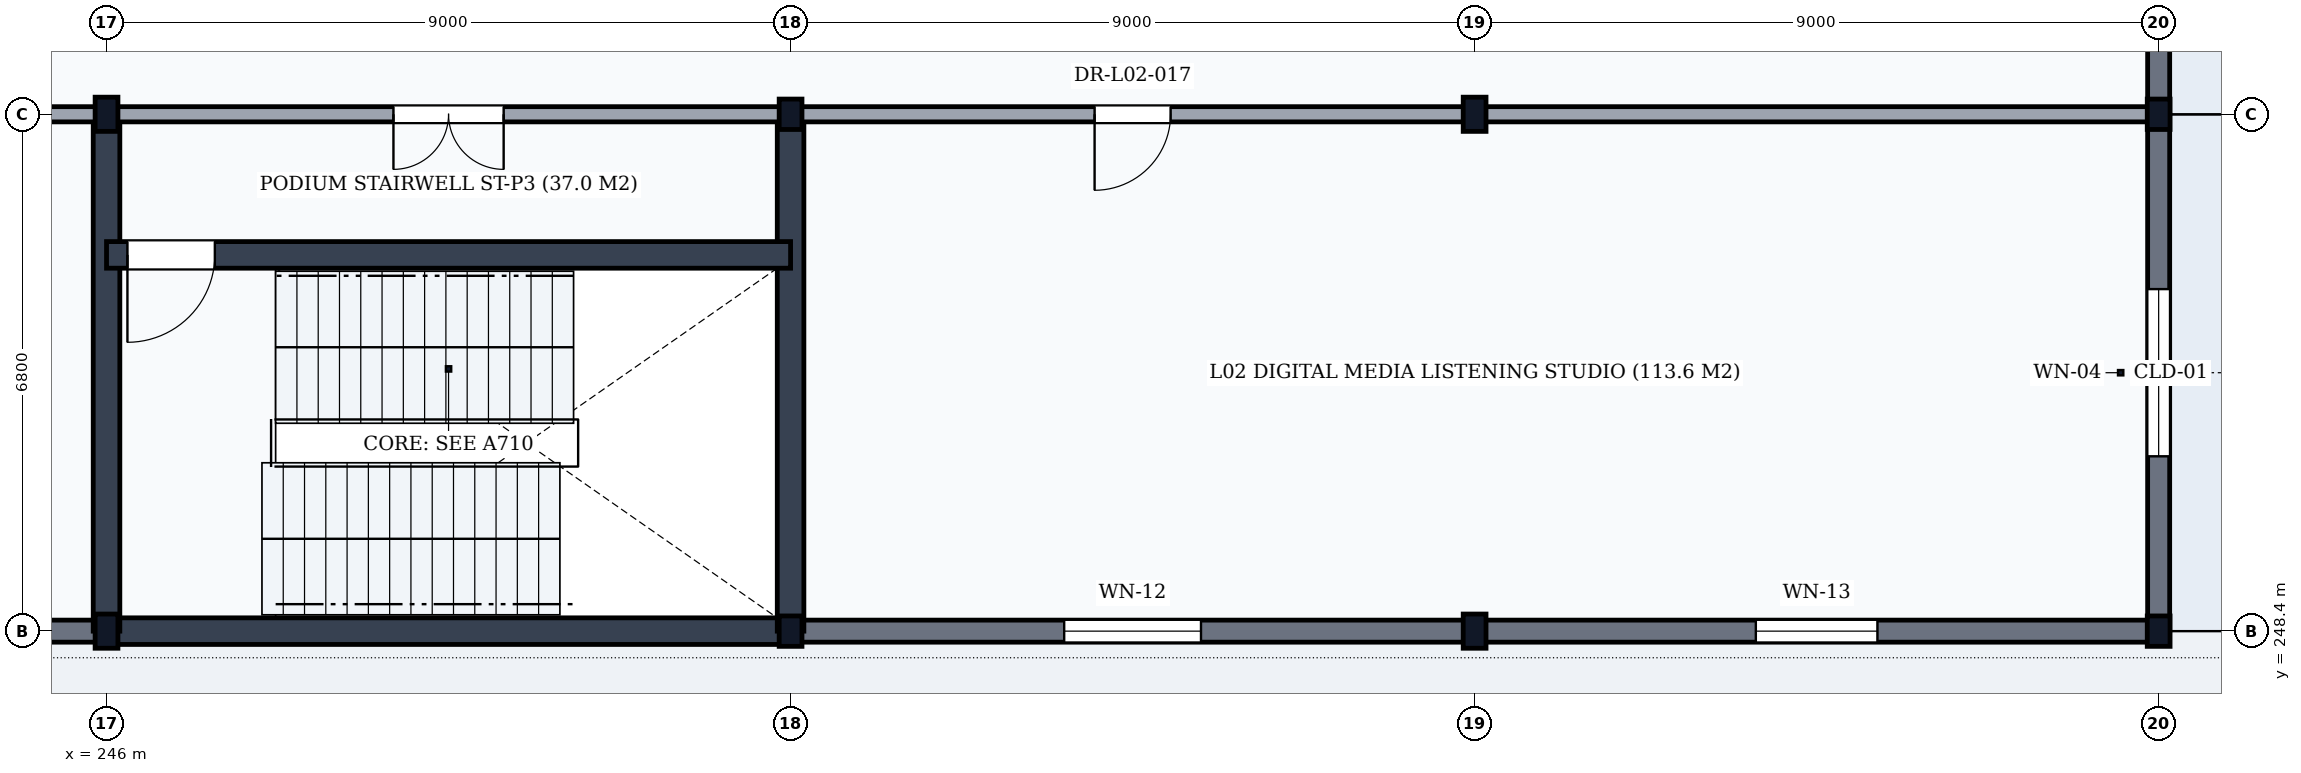
"""IFC4 building model, lengths in metres.
Left out: names, types, materials, properties, quantities, classifications, styles, units other than length and angle.
Written with IfcOpenShell. Run it as: python <this file> out.ifc"""

import sys

from ifc_helpers import new_model, si_unit, direction, frame, frame_2d, origin, origin_2d, place, context, subcontext, project, spatial, rectangle, i_section, extrude, element, fill, save


model = new_model("IFC4")
c1 = context("Model", 3, precision=1e-05, world=origin(), true_north=direction((0.0, 1.0)))
c2 = subcontext(c1, "Body", "Model", "MODEL_VIEW")
j1 = project(units=[si_unit("LENGTHUNIT", "METRE"), si_unit("PLANEANGLEUNIT", "RADIAN")], contexts=[c1])
p1 = place(None, origin())
s1 = spatial("IfcSite", under=j1, at=p1, CompositionType="ELEMENT")
p2 = place(p1, origin())
s2 = spatial("IfcBuilding", under=s1, at=p2, CompositionType="ELEMENT")
p3 = place(p2, frame((0.0, 0.0, 5.4)))
s3 = spatial("IfcBuildingStorey", under=s2, at=p3, CompositionType="ELEMENT", Elevation=5.4)
for number, where, z_axis, x_axis in (
    (1, (246.0, 248.4, 0.0), (0.0, 0.0, 1.0), (1.0, 0.0, 0.0)),
    (2, (246.0, 255.2, 0.0), (0.0, 0.0, 1.0), (1.0, 0.0, 0.0)),
):
    element("IfcColumn", number, at=place(p3, frame(where, z_axis=z_axis, x_axis=x_axis)), inside=s3, PredefinedType="COLUMN", context=c2, shape_type="SweptSolid", body=[
        extrude(i_section(OverallWidth=0.3, OverallDepth=0.45, WebThickness=0.014, FlangeThickness=0.026, FilletRadius=0.027, at=origin_2d()), origin(), (0.0, 0.0, 1.0), 5.1),
    ])
for number, where, z_axis, x_axis in (
    (3, (255.0, 248.4, 0.0), (0.0, 0.0, 1.0), (1.0, 0.0, 0.0)),
    (4, (255.0, 255.2, 0.0), (0.0, 0.0, 1.0), (1.0, 0.0, 0.0)),
):
    element("IfcColumn", number, at=place(p3, frame(where, z_axis=z_axis, x_axis=x_axis)), inside=s3, PredefinedType="COLUMN", context=c2, shape_type="SweptSolid", body=[
        extrude(i_section(OverallWidth=0.3, OverallDepth=0.4, WebThickness=0.013, FlangeThickness=0.024, FilletRadius=0.027, at=origin_2d()), origin(), (0.0, 0.0, 1.0), 5.1),
    ])
for number, where, z_axis, x_axis in (
    (5, (264.0, 248.4, 0.0), (0.0, 0.0, 1.0), (1.0, 0.0, 0.0)),
    (6, (264.0, 255.2, 0.0), (0.0, 0.0, 1.0), (1.0, 0.0, 0.0)),
):
    element("IfcColumn", number, at=place(p3, frame(where, z_axis=z_axis, x_axis=x_axis)), inside=s3, PredefinedType="COLUMN", context=c2, shape_type="SweptSolid", body=[
        extrude(i_section(OverallWidth=0.3, OverallDepth=0.45, WebThickness=0.014, FlangeThickness=0.026, FilletRadius=0.027, at=origin_2d()), origin(), (0.0, 0.0, 1.0), 5.1),
    ])
for number, where, z_axis, x_axis in (
    (7, (273.0, 248.4, 0.0), (0.0, 0.0, 1.0), (1.0, 0.0, 0.0)),
    (8, (273.0, 255.2, 0.0), (0.0, 0.0, 1.0), (1.0, 0.0, 0.0)),
):
    element("IfcColumn", number, at=place(p3, frame(where, z_axis=z_axis, x_axis=x_axis)), inside=s3, PredefinedType="COLUMN", context=c2, shape_type="SweptSolid", body=[
        extrude(i_section(OverallWidth=0.3, OverallDepth=0.4, WebThickness=0.013, FlangeThickness=0.024, FilletRadius=0.027, at=origin_2d()), origin(), (0.0, 0.0, 1.0), 5.1),
    ])
p4 = place(p3, frame((237.006, 248.4, 0.0), z_axis=(0.0, 0.0, 1.0), x_axis=(1.0, 0.0, 0.0)))
e9 = element("IfcWall", 9, at=p4, inside=s3, PredefinedType="SOLIDWALL", context=c2, shape_type="SweptSolid", body=[
    extrude(rectangle(XDim=8.988, YDim=0.29, at=frame_2d((4.494, 0.0))), origin(), (0.0, 0.0, 1.0), 4.508),
])
p5 = place(p4, frame((3.394, 0.0, 0.95)))
e10 = element("IfcOpeningElement", 10, at=p5, cuts=e9, PredefinedType="OPENING", context=c2, shape_type="SweptSolid", body=[
    extrude(rectangle(XDim=2.2, YDim=2.1, at=frame_2d((1.1, 1.05))), frame((0.0, 0.16, 0.0), z_axis=(0.0, -1.0, 0.0), x_axis=(1.0, 0.0, 0.0)), (0.0, 0.0, 1.0), 0.32),
])
p6 = place(p3, frame((255.006, 248.4, 0.0), z_axis=(0.0, 0.0, 1.0), x_axis=(1.0, 0.0, 0.0)))
e11 = element("IfcWall", 11, at=p6, inside=s3, PredefinedType="SOLIDWALL", context=c2, shape_type="SweptSolid", body=[
    extrude(rectangle(XDim=8.988, YDim=0.29, at=frame_2d((4.494, 0.0))), origin(), (0.0, 0.0, 1.0), 4.508),
])
p7 = place(p6, frame((3.594, 0.0, 0.95)))
e12 = element("IfcOpeningElement", 12, at=p7, cuts=e11, PredefinedType="OPENING", context=c2, shape_type="SweptSolid", body=[
    extrude(rectangle(XDim=1.8, YDim=2.0, at=frame_2d((0.9, 1.0))), frame((0.0, 0.16, 0.0), z_axis=(0.0, -1.0, 0.0), x_axis=(1.0, 0.0, 0.0)), (0.0, 0.0, 1.0), 0.32),
])
p8 = place(p3, frame((264.006, 248.4, 0.0), z_axis=(0.0, 0.0, 1.0), x_axis=(1.0, 0.0, 0.0)))
e13 = element("IfcWall", 13, at=p8, inside=s3, PredefinedType="SOLIDWALL", context=c2, shape_type="SweptSolid", body=[
    extrude(rectangle(XDim=8.988, YDim=0.29, at=frame_2d((4.494, 0.0))), origin(), (0.0, 0.0, 1.0), 4.508),
])
p9 = place(p8, frame((3.694, 0.0, 0.95)))
e14 = element("IfcOpeningElement", 14, at=p9, cuts=e13, PredefinedType="OPENING", context=c2, shape_type="SweptSolid", body=[
    extrude(rectangle(XDim=1.6, YDim=2.0, at=frame_2d((0.8, 1.0))), frame((0.0, 0.16, 0.0), z_axis=(0.0, -1.0, 0.0), x_axis=(1.0, 0.0, 0.0)), (0.0, 0.0, 1.0), 0.32),
])
p10 = place(p3, frame((273.0, 248.406, 0.0), z_axis=(0.0, 0.0, 1.0), x_axis=(0.0, 1.0, 0.0)))
e15 = element("IfcWall", 15, at=p10, inside=s3, PredefinedType="SOLIDWALL", context=c2, shape_type="SweptSolid", body=[
    extrude(rectangle(XDim=6.788, YDim=0.29, at=frame_2d((3.394, 0.0))), origin(), (0.0, 0.0, 1.0), 4.628),
])
p11 = place(p10, frame((2.294, 0.0, 0.95)))
e16 = element("IfcOpeningElement", 16, at=p11, cuts=e15, PredefinedType="OPENING", context=c2, shape_type="SweptSolid", body=[
    extrude(rectangle(XDim=2.2, YDim=2.8, at=frame_2d((1.1, 1.4))), frame((0.0, 0.16, 0.0), z_axis=(0.0, -1.0, 0.0), x_axis=(1.0, 0.0, 0.0)), (0.0, 0.0, 1.0), 0.32),
])
p12 = place(p3, frame((273.0, 255.206, 0.0), z_axis=(0.0, 0.0, 1.0), x_axis=(0.0, 1.0, 0.0)))
e17 = element("IfcWall", 17, at=p12, inside=s3, PredefinedType="SOLIDWALL", context=c2, shape_type="SweptSolid", body=[
    extrude(rectangle(XDim=7.588, YDim=0.29, at=frame_2d((3.794, 0.0))), origin(), (0.0, 0.0, 1.0), 4.588),
])
p13 = place(p12, frame((4.066, 0.0, 0.95)))
e18 = element("IfcOpeningElement", 18, at=p13, cuts=e17, PredefinedType="OPENING", context=c2, shape_type="SweptSolid", body=[
    extrude(rectangle(XDim=2.0, YDim=2.6, at=frame_2d((1.0, 1.3))), frame((0.0, 0.16, 0.0), z_axis=(0.0, -1.0, 0.0), x_axis=(1.0, 0.0, 0.0)), (0.0, 0.0, 1.0), 0.32),
])
p14 = place(p3, frame((246.0, 248.4, 0.0), z_axis=(0.0, 0.0, 1.0), x_axis=(1.0, 0.0, 0.0)))
e19 = element("IfcWall", 19, at=p14, inside=s3, PredefinedType="SHEAR", context=c2, shape_type="SweptSolid", body=[
    extrude(rectangle(XDim=9.0, YDim=0.35, at=frame_2d((4.5, 0.0))), origin(), (0.0, 0.0, 1.0), 4.86),
])
for number, where, z_axis, x_axis in (
    (20, (246.0, 248.4, 0.0), (0.0, 0.0, 1.0), (0.0, 1.0, 0.0)),
    (21, (255.0, 248.4, 0.0), (0.0, 0.0, 1.0), (0.0, 1.0, 0.0)),
):
    element("IfcWall", number, at=place(p3, frame(where, z_axis=z_axis, x_axis=x_axis)), inside=s3, PredefinedType="SHEAR", context=c2, shape_type="SweptSolid", body=[
        extrude(rectangle(XDim=6.8, YDim=0.35, at=frame_2d((3.4, 0.0))), origin(), (0.0, 0.0, 1.0), 4.86),
    ])
p15 = place(p3, frame((246.0, 253.35, 0.0), z_axis=(0.0, 0.0, 1.0), x_axis=(1.0, 0.0, 0.0)))
e22 = element("IfcWall", 22, at=p15, inside=s3, PredefinedType="SHEAR", context=c2, shape_type="SweptSolid", body=[
    extrude(rectangle(XDim=9.0, YDim=0.35, at=frame_2d((4.5, 0.0))), origin(), (0.0, 0.0, 1.0), 4.86),
])
p16 = place(p15, frame((0.275, 0.0, 0.0)))
e23 = element("IfcOpeningElement", 23, at=p16, cuts=e22, PredefinedType="OPENING", context=c2, shape_type="SweptSolid", body=[
    extrude(rectangle(XDim=1.15, YDim=2.15, at=frame_2d((0.575, 1.075))), frame((0.0, 0.19, 0.0), z_axis=(0.0, -1.0, 0.0), x_axis=(1.0, 0.0, 0.0)), (0.0, 0.0, 1.0), 0.38),
])
p17 = place(p3, frame((246.0, 255.2, 0.0), z_axis=(0.0, 0.0, 1.0), x_axis=(1.0, 0.0, 0.0)))
e24 = element("IfcWall", 24, at=p17, inside=s3, PredefinedType="PARTITIONING", context=c2, shape_type="SweptSolid", body=[
    extrude(rectangle(XDim=9.0, YDim=0.2, at=frame_2d((4.5, 0.0))), origin(), (0.0, 0.0, 1.0), 4.308),
])
p18 = place(p17, frame((3.775, 0.0, 0.0)))
e25 = element("IfcOpeningElement", 25, at=p18, cuts=e24, PredefinedType="OPENING", context=c2, shape_type="SweptSolid", body=[
    extrude(rectangle(XDim=1.45, YDim=2.2, at=frame_2d((0.725, 1.1))), frame((0.0, 0.115, 0.0), z_axis=(0.0, -1.0, 0.0), x_axis=(1.0, 0.0, 0.0)), (0.0, 0.0, 1.0), 0.23),
])
p19 = place(p3, frame((237.0, 255.2, 0.0), z_axis=(0.0, 0.0, 1.0), x_axis=(1.0, 0.0, 0.0)))
e26 = element("IfcWall", 26, at=p19, inside=s3, PredefinedType="PARTITIONING", context=c2, shape_type="SweptSolid", body=[
    extrude(rectangle(XDim=9.0, YDim=0.2, at=frame_2d((4.5, 0.0))), origin(), (0.0, 0.0, 1.0), 4.308),
])
p20 = place(p19, frame((4.0, 0.0, 0.0)))
e27 = element("IfcOpeningElement", 27, at=p20, cuts=e26, PredefinedType="OPENING", context=c2, shape_type="SweptSolid", body=[
    extrude(rectangle(XDim=1.0, YDim=2.1, at=frame_2d((0.5, 1.05))), frame((0.0, 0.115, 0.0), z_axis=(0.0, -1.0, 0.0), x_axis=(1.0, 0.0, 0.0)), (0.0, 0.0, 1.0), 0.23),
])
p21 = place(p3, frame((255.0, 255.2, 0.0), z_axis=(0.0, 0.0, 1.0), x_axis=(1.0, 0.0, 0.0)))
e28 = element("IfcWall", 28, at=p21, inside=s3, PredefinedType="PARTITIONING", context=c2, shape_type="SweptSolid", body=[
    extrude(rectangle(XDim=18.0, YDim=0.2, at=frame_2d((9.0, 0.0))), origin(), (0.0, 0.0, 1.0), 4.308),
])
p22 = place(p21, frame((4.0, 0.0, 0.0)))
e29 = element("IfcOpeningElement", 29, at=p22, cuts=e28, PredefinedType="OPENING", context=c2, shape_type="SweptSolid", body=[
    extrude(rectangle(XDim=1.0, YDim=2.1, at=frame_2d((0.5, 1.05))), frame((0.0, 0.115, 0.0), z_axis=(0.0, -1.0, 0.0), x_axis=(1.0, 0.0, 0.0)), (0.0, 0.0, 1.0), 0.23),
])
p23 = place(p7, origin())
e30 = element("IfcWindow", 30, at=p23, inside=s3, PartitioningType="DOUBLE_PANEL_VERTICAL", PredefinedType="WINDOW", context=c2, shape_type="SweptSolid", body=[
    extrude(rectangle(XDim=1.8, YDim=2.0, at=frame_2d((0.9, 1.0))), frame((0.0, 0.03, 0.0), z_axis=(0.0, -1.0, 0.0), x_axis=(1.0, 0.0, 0.0)), (0.0, 0.0, 1.0), 0.06),
])
fill(e12, e30)
p24 = place(p9, origin())
e31 = element("IfcWindow", 31, at=p24, inside=s3, PartitioningType="SINGLE_PANEL", PredefinedType="WINDOW", context=c2, shape_type="SweptSolid", body=[
    extrude(rectangle(XDim=1.6, YDim=2.0, at=frame_2d((0.8, 1.0))), frame((0.0, 0.03, 0.0), z_axis=(0.0, -1.0, 0.0), x_axis=(1.0, 0.0, 0.0)), (0.0, 0.0, 1.0), 0.06),
])
fill(e14, e31)
p25 = place(p11, origin())
e32 = element("IfcWindow", 32, at=p25, inside=s3, PartitioningType="DOUBLE_PANEL_VERTICAL", PredefinedType="WINDOW", context=c2, shape_type="SweptSolid", body=[
    extrude(rectangle(XDim=2.2, YDim=2.8, at=frame_2d((1.1, 1.4))), frame((0.0, 0.03, 0.0), z_axis=(0.0, -1.0, 0.0), x_axis=(1.0, 0.0, 0.0)), (0.0, 0.0, 1.0), 0.06),
])
fill(e16, e32)
p26 = place(p16, frame((1.15, 0.0, 0.0), z_axis=(0.0, 0.0, 1.0), x_axis=(-1.0, 0.0, 0.0)))
e33 = element("IfcDoor", 33, at=p26, inside=s3, OperationType="SINGLE_SWING_RIGHT", PredefinedType="DOOR", context=c2, shape_type="SweptSolid", body=[
    extrude(rectangle(XDim=1.15, YDim=2.15, at=frame_2d((0.575, 1.075))), frame((0.0, 0.025, 0.0), z_axis=(0.0, -1.0, 0.0), x_axis=(1.0, 0.0, 0.0)), (0.0, 0.0, 1.0), 0.05),
])
fill(e23, e33)
p27 = place(p18, frame((1.45, 0.0, 0.0), z_axis=(0.0, 0.0, 1.0), x_axis=(-1.0, 0.0, 0.0)))
e34 = element("IfcDoor", 34, at=p27, inside=s3, OperationType="DOUBLE_DOOR_SINGLE_SWING", PredefinedType="DOOR", context=c2, shape_type="SweptSolid", body=[
    extrude(rectangle(XDim=1.45, YDim=2.2, at=frame_2d((0.725, 1.1))), frame((0.0, 0.025, 0.0), z_axis=(0.0, -1.0, 0.0), x_axis=(1.0, 0.0, 0.0)), (0.0, 0.0, 1.0), 0.05),
])
fill(e25, e34)
p28 = place(p22, frame((1.0, 0.0, 0.0), z_axis=(0.0, 0.0, 1.0), x_axis=(-1.0, 0.0, 0.0)))
e35 = element("IfcDoor", 35, at=p28, inside=s3, OperationType="SINGLE_SWING_RIGHT", PredefinedType="DOOR", context=c2, shape_type="SweptSolid", body=[
    extrude(rectangle(XDim=1.0, YDim=2.1, at=frame_2d((0.5, 1.05))), frame((0.0, 0.025, 0.0), z_axis=(0.0, -1.0, 0.0), x_axis=(1.0, 0.0, 0.0)), (0.0, 0.0, 1.0), 0.05),
])
fill(e29, e35)
save(model, sys.argv[1])
